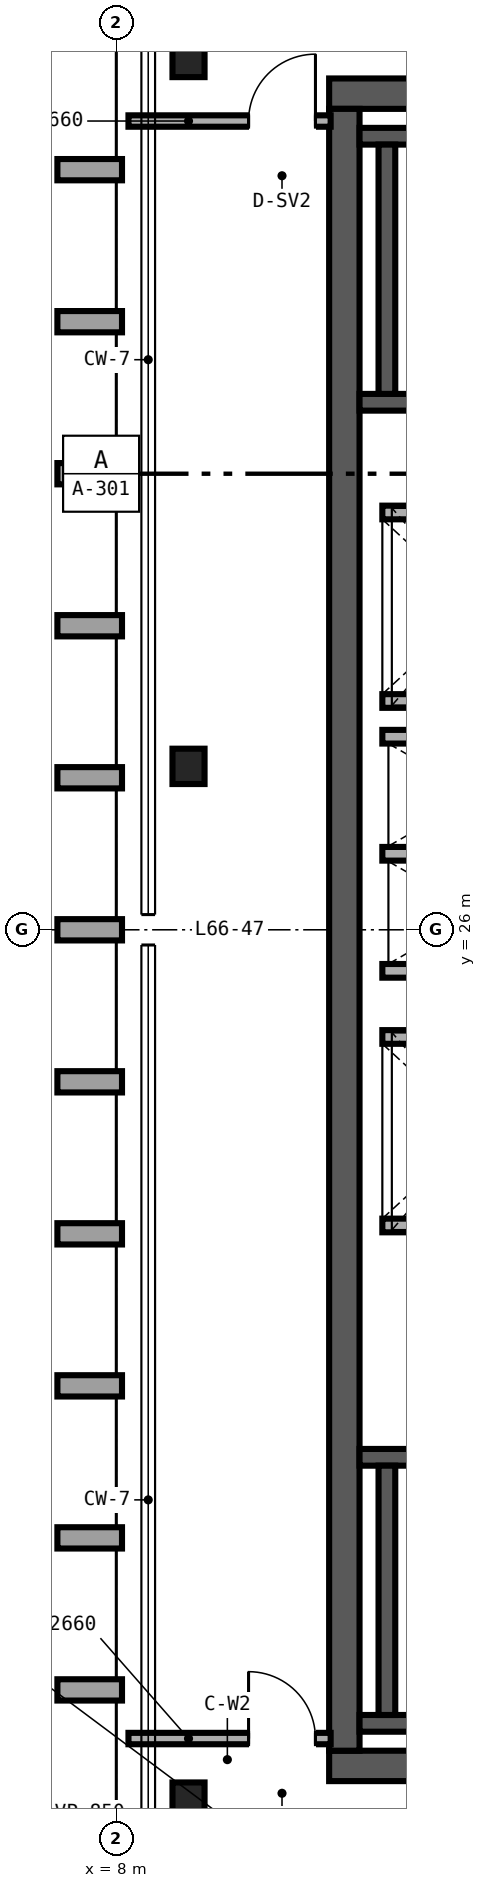
"""IFC4 building model, lengths in metres.
Left out: names, types, materials, properties, quantities, classifications, styles, units other than length and angle.
Written with IfcOpenShell. Run it as: python <this file> out.ifc"""

import sys

from ifc_helpers import new_model, si_unit, direction, frame, frame_2d, origin, origin_2d, place, context, subcontext, project, spatial, rectangle, i_section, extrude, source, transform, mapped, element, fill, save


model = new_model("IFC4")
c1 = context("Model", 3, precision=1e-05, world=origin(), true_north=direction((0.0, 1.0)))
c2 = subcontext(c1, "Body", "Model", "MODEL_VIEW")
j1 = project(units=[si_unit("LENGTHUNIT", "METRE"), si_unit("PLANEANGLEUNIT", "RADIAN")], contexts=[c1])
p1 = place(None, origin())
s1 = spatial("IfcSite", under=j1, at=p1, CompositionType="ELEMENT")
p2 = place(p1, origin())
s2 = spatial("IfcBuilding", under=s1, at=p2, CompositionType="ELEMENT")
p3 = place(p2, frame((0.0, 0.0, 261.6)))
s3 = spatial("IfcBuildingStorey", under=s2, at=p3, CompositionType="ELEMENT", Elevation=261.6)
p4 = place(p3, frame((10.8, 15.0, 0.0), z_axis=(0.0, 0.0, 1.0), x_axis=(1.0, 0.0, 0.0)))
e1 = element("IfcWall", 1, at=p4, inside=s3, PredefinedType="SHEAR", context=c2, shape_type="SweptSolid", body=[
    extrude(rectangle(XDim=12.4, YDim=0.4, at=frame_2d((6.2, 0.0))), origin(), (0.0, 0.0, 1.0), 3.38),
])
p5 = place(p4, frame((8.78, 0.0, 0.0)))
e2 = element("IfcOpeningElement", 2, at=p5, cuts=e1, PredefinedType="OPENING", context=c2, shape_type="SweptSolid", body=[
    extrude(rectangle(XDim=1.0, YDim=2.15, at=frame_2d((0.5, 1.075))), frame((0.0, 0.21, 0.0), z_axis=(0.0, -1.0, 0.0), x_axis=(1.0, 0.0, 0.0)), (0.0, 0.0, 1.0), 0.42),
])
p6 = place(p3, frame((10.8, 37.0, 0.0), z_axis=(0.0, 0.0, 1.0), x_axis=(1.0, 0.0, 0.0)))
e3 = element("IfcWall", 3, at=p6, inside=s3, PredefinedType="SHEAR", context=c2, shape_type="SweptSolid", body=[
    extrude(rectangle(XDim=12.4, YDim=0.4, at=frame_2d((6.2, 0.0))), origin(), (0.0, 0.0, 1.0), 3.38),
])
p7 = place(p6, frame((8.78, 0.0, 0.0)))
e4 = element("IfcOpeningElement", 4, at=p7, cuts=e3, PredefinedType="OPENING", context=c2, shape_type="SweptSolid", body=[
    extrude(rectangle(XDim=1.0, YDim=2.15, at=frame_2d((0.5, 1.075))), frame((0.0, 0.21, 0.0), z_axis=(0.0, -1.0, 0.0), x_axis=(1.0, 0.0, 0.0)), (0.0, 0.0, 1.0), 0.42),
])
p8 = place(p3, frame((11.0, 15.2, 0.0), z_axis=(0.0, 0.0, 1.0), x_axis=(0.0, 1.0, 0.0)))
e5 = element("IfcWall", 5, at=p8, inside=s3, PredefinedType="SHEAR", context=c2, shape_type="SweptSolid", body=[
    extrude(rectangle(XDim=21.6, YDim=0.4, at=frame_2d((10.8, 0.0))), origin(), (0.0, 0.0, 1.0), 3.38),
])
p9 = place(p3, frame((11.2, 15.56, 0.0), z_axis=(0.0, 0.0, 1.0), x_axis=(1.0, 0.0, 0.0)))
e6 = element("IfcWall", 6, at=p9, inside=s3, PredefinedType="SHEAR", context=c2, shape_type="SweptSolid", body=[
    extrude(rectangle(XDim=8.11, YDim=0.22, at=frame_2d((4.055, 0.0))), origin(), (0.0, 0.0, 1.0), 3.4),
])
p10 = place(p3, frame((11.2, 19.06, 0.0), z_axis=(0.0, 0.0, 1.0), x_axis=(1.0, 0.0, 0.0)))
e7 = element("IfcWall", 7, at=p10, inside=s3, PredefinedType="SHEAR", context=c2, shape_type="SweptSolid", body=[
    extrude(rectangle(XDim=8.11, YDim=0.22, at=frame_2d((4.055, 0.0))), origin(), (0.0, 0.0, 1.0), 3.4),
])
p11 = place(p10, frame((0.72, 0.0, 0.0)))
e8 = element("IfcOpeningElement", 8, at=p11, cuts=e7, PredefinedType="OPENING", context=c2, shape_type="SweptSolid", body=[
    extrude(rectangle(XDim=1.05, YDim=2.15, at=frame_2d((0.525, 1.075))), frame((0.0, 0.12, 0.0), z_axis=(0.0, -1.0, 0.0), x_axis=(1.0, 0.0, 0.0)), (0.0, 0.0, 1.0), 0.24),
])
p12 = place(p3, frame((11.56, 15.67, 0.0), z_axis=(0.0, 0.0, 1.0), x_axis=(0.0, 1.0, 0.0)))
e9 = element("IfcWall", 9, at=p12, inside=s3, PredefinedType="SHEAR", context=c2, shape_type="SweptSolid", body=[
    extrude(rectangle(XDim=3.28, YDim=0.22, at=frame_2d((1.64, 0.0))), origin(), (0.0, 0.0, 1.0), 3.4),
])
p13 = place(p3, frame((11.2, 32.94, 0.0), z_axis=(0.0, 0.0, 1.0), x_axis=(1.0, 0.0, 0.0)))
e10 = element("IfcWall", 10, at=p13, inside=s3, PredefinedType="SHEAR", context=c2, shape_type="SweptSolid", body=[
    extrude(rectangle(XDim=8.11, YDim=0.22, at=frame_2d((4.055, 0.0))), origin(), (0.0, 0.0, 1.0), 3.4),
])
p14 = place(p13, frame((0.72, 0.0, 0.0)))
e11 = element("IfcOpeningElement", 11, at=p14, cuts=e10, PredefinedType="OPENING", context=c2, shape_type="SweptSolid", body=[
    extrude(rectangle(XDim=1.05, YDim=2.15, at=frame_2d((0.525, 1.075))), frame((0.0, 0.12, 0.0), z_axis=(0.0, -1.0, 0.0), x_axis=(1.0, 0.0, 0.0)), (0.0, 0.0, 1.0), 0.24),
])
p15 = place(p3, frame((11.2, 36.44, 0.0), z_axis=(0.0, 0.0, 1.0), x_axis=(1.0, 0.0, 0.0)))
e12 = element("IfcWall", 12, at=p15, inside=s3, PredefinedType="SHEAR", context=c2, shape_type="SweptSolid", body=[
    extrude(rectangle(XDim=8.11, YDim=0.22, at=frame_2d((4.055, 0.0))), origin(), (0.0, 0.0, 1.0), 3.4),
])
p16 = place(p3, frame((11.56, 33.05, 0.0), z_axis=(0.0, 0.0, 1.0), x_axis=(0.0, 1.0, 0.0)))
e13 = element("IfcWall", 13, at=p16, inside=s3, PredefinedType="SHEAR", context=c2, shape_type="SweptSolid", body=[
    extrude(rectangle(XDim=3.28, YDim=0.22, at=frame_2d((1.64, 0.0))), origin(), (0.0, 0.0, 1.0), 3.4),
])
m1 = source(origin(), c2, "Body", "SweptSolid", [
    extrude(i_section(OverallWidth=0.422, OverallDepth=0.465, WebThickness=0.045, FlangeThickness=0.073, FilletRadius=0.025, at=origin_2d()), origin(), (0.0, 0.0, 1.0), 3.38),
])
for number, where, z_axis, x_axis in (
    (14, (8.95, 14.55, 0.0), (0.0, 0.0, 1.0), (1.0, 0.0, 0.0)),
    (15, (8.95, 28.15, 0.0), (0.0, 0.0, 1.0), (1.0, 0.0, 0.0)),
    (16, (8.95, 37.45, 0.0), (0.0, 0.0, 1.0), (1.0, 0.0, 0.0)),
):
    element("IfcColumn", number, at=place(p3, frame(where, z_axis=z_axis, x_axis=x_axis)), inside=s3, PredefinedType="COLUMN", context=c2, shape_type="MappedRepresentation", body=[
        mapped(m1, transform((0.0, 0.0, 0.0), scale=1.0)),
    ])
for number, where, z_axis, x_axis in (
    (17, (11.5, 22.11, 0.0), (0.0, 0.0, 1.0), (1.0, 0.0, 0.0)),
    (18, (11.5, 24.59, 0.0), (0.0, 0.0, 1.0), (1.0, 0.0, 0.0)),
    (19, (11.5, 29.01, 0.0), (0.0, 0.0, 1.0), (1.0, 0.0, 0.0)),
    (20, (11.5, 31.49, 0.0), (0.0, 0.0, 1.0), (1.0, 0.0, 0.0)),
):
    element("IfcWall", number, at=place(p3, frame(where, z_axis=z_axis, x_axis=x_axis)), inside=s3, PredefinedType="SOLIDWALL", context=c2, shape_type="SweptSolid", body=[
        extrude(rectangle(XDim=2.5, YDim=0.18, at=frame_2d((1.25, 0.0))), origin(), (0.0, 0.0, 1.0), 3.38),
    ])
for number, where, z_axis, x_axis in (
    (21, (11.5, 25.46, 0.0), (0.0, 0.0, 1.0), (1.0, 0.0, 0.0)),
    (22, (11.5, 27.0, 0.0), (0.0, 0.0, 1.0), (1.0, 0.0, 0.0)),
    (23, (11.5, 28.54, 0.0), (0.0, 0.0, 1.0), (1.0, 0.0, 0.0)),
):
    element("IfcWall", number, at=place(p3, frame(where, z_axis=z_axis, x_axis=x_axis)), inside=s3, PredefinedType="SOLIDWALL", context=c2, shape_type="SweptSolid", body=[
        extrude(rectangle(XDim=2.51, YDim=0.18, at=frame_2d((1.255, 0.0))), origin(), (0.0, 0.0, 1.0), 3.38),
    ])
p17 = place(p3, frame((8.16, 15.36, 0.0), z_axis=(0.0, 0.0, 1.0), x_axis=(1.0, 0.0, 0.0)))
e24 = element("IfcWall", 24, at=p17, inside=s3, PredefinedType="PARTITIONING", context=c2, shape_type="SweptSolid", body=[
    extrude(rectangle(XDim=2.66, YDim=0.15, at=frame_2d((1.33, 0.0))), origin(), (0.0, 0.0, 1.0), 2.601),
])
p18 = place(p17, frame((1.58, 0.0, 0.0)))
e25 = element("IfcOpeningElement", 25, at=p18, cuts=e24, PredefinedType="OPENING", context=c2, shape_type="SweptSolid", body=[
    extrude(rectangle(XDim=0.88, YDim=2.15, at=frame_2d((0.44, 1.075))), frame((0.0, 0.085, 0.0), z_axis=(0.0, -1.0, 0.0), x_axis=(1.0, 0.0, 0.0)), (0.0, 0.0, 1.0), 0.17),
])
p19 = place(p3, frame((8.16, 36.64, 0.0), z_axis=(0.0, 0.0, 1.0), x_axis=(1.0, 0.0, 0.0)))
e26 = element("IfcWall", 26, at=p19, inside=s3, PredefinedType="PARTITIONING", context=c2, shape_type="SweptSolid", body=[
    extrude(rectangle(XDim=2.66, YDim=0.15, at=frame_2d((1.33, 0.0))), origin(), (0.0, 0.0, 1.0), 2.763),
])
p20 = place(p19, frame((1.58, 0.0, 0.0)))
e27 = element("IfcOpeningElement", 27, at=p20, cuts=e26, PredefinedType="OPENING", context=c2, shape_type="SweptSolid", body=[
    extrude(rectangle(XDim=0.88, YDim=2.15, at=frame_2d((0.44, 1.075))), frame((0.0, 0.085, 0.0), z_axis=(0.0, -1.0, 0.0), x_axis=(1.0, 0.0, 0.0)), (0.0, 0.0, 1.0), 0.17),
])
m2 = source(origin(), c2, "Body", "SweptSolid", [
    extrude(rectangle(XDim=0.88, YDim=2.15, at=frame_2d((0.44, 1.075))), frame((0.0, 0.025, 0.0), z_axis=(0.0, -1.0, 0.0), x_axis=(1.0, 0.0, 0.0)), (0.0, 0.0, 1.0), 0.05),
])
p21 = place(p18, origin())
e28 = element("IfcDoor", 28, at=p21, inside=s3, OperationType="SINGLE_SWING_LEFT", PredefinedType="DOOR", context=c2, shape_type="MappedRepresentation", body=[
    mapped(m2, transform((0.0, 0.0, 0.0), scale=1.0)),
])
fill(e25, e28)
p22 = place(p20, origin())
e29 = element("IfcDoor", 29, at=p22, inside=s3, OperationType="SINGLE_SWING_RIGHT", PredefinedType="DOOR", context=c2, shape_type="MappedRepresentation", body=[
    mapped(m2, transform((0.0, 0.0, 0.0), scale=1.0)),
])
fill(e27, e29)
save(model, sys.argv[1])
